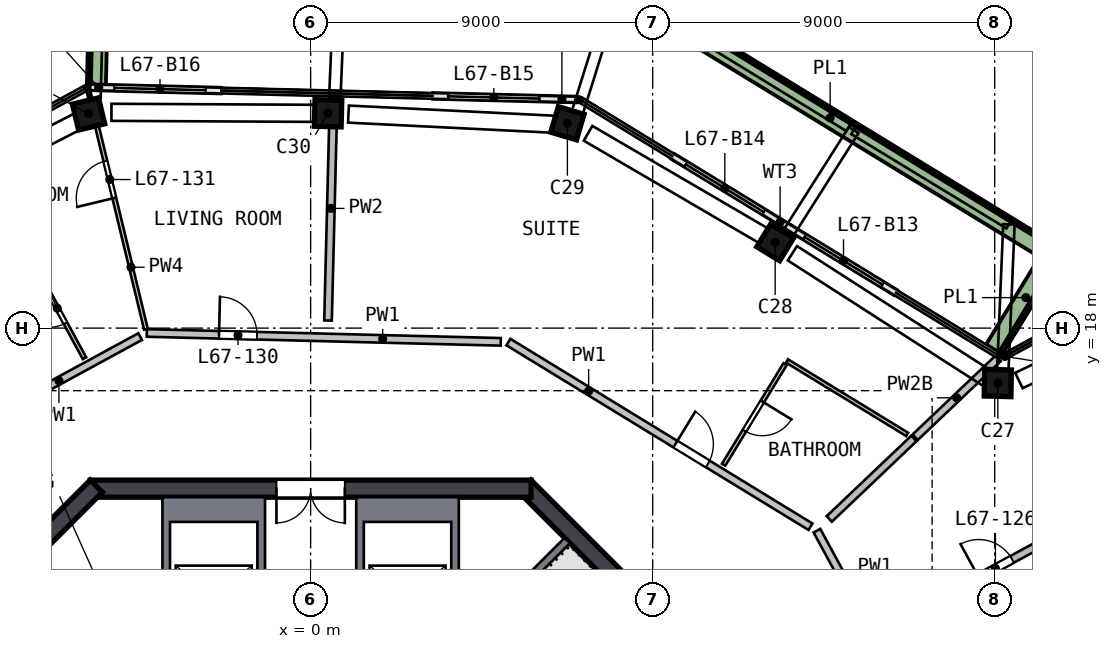
"""IFC4 building model, lengths in metres.
Left out: names, types, materials, properties, quantities, classifications, styles, units other than length and angle.
Written with IfcOpenShell. Run it as: python <this file> out.ifc"""

import sys

from ifc_helpers import new_model, si_unit, direction, frame, frame_2d, origin, origin_2d, place, context, subcontext, project, spatial, polyline, rectangle, outline, extrude, element, fill, save


model = new_model("IFC4")
c1 = context("Model", 3, precision=1e-05, world=origin(), true_north=direction((0.0, 1.0)))
c2 = subcontext(c1, "Body", "Model", "MODEL_VIEW")
j1 = project(units=[si_unit("LENGTHUNIT", "METRE"), si_unit("PLANEANGLEUNIT", "RADIAN")], contexts=[c1])
p1 = place(None, origin())
s1 = spatial("IfcSite", under=j1, at=p1, CompositionType="ELEMENT")
p2 = place(p1, origin())
s2 = spatial("IfcBuilding", under=s1, at=p2, CompositionType="ELEMENT")
p3 = place(p2, frame((0.0, 0.0, 274.0)))
s3 = spatial("IfcBuildingStorey", under=s2, at=p3, CompositionType="ELEMENT", Elevation=274.0)
p4 = place(p3, frame((18.177, 16.452, 0.0), z_axis=(-0.078901161, 0.085818315, 0.993181667), x_axis=(0.996553519, -0.018801079, 0.080793584)))
e1 = element("IfcColumn", 1, at=p4, inside=s3, PredefinedType="COLUMN", context=c2, shape_type="SweptSolid", body=[
    extrude(rectangle(XDim=0.7, YDim=0.7, at=origin_2d()), origin(), (0.0, 0.0, 1.0), 3.212),
])
p5 = place(p3, frame((12.34, 20.185, 0.0), z_axis=(-0.096505434, 0.057872841, 0.993648547), x_axis=(-0.847798451, 0.518243304, -0.112524062)))
e2 = element("IfcColumn", 2, at=p5, inside=s3, PredefinedType="COLUMN", context=c2, shape_type="SweptSolid", body=[
    extrude(rectangle(XDim=0.7, YDim=0.7, at=origin_2d()), origin(), (0.0, 0.0, 1.0), 3.21),
])
p6 = place(p3, frame((6.891, 23.353, 0.0), z_axis=(-0.111293246, 0.03185237, 0.993277021), x_axis=(0.952582043, -0.281402991, 0.115757536)))
e3 = element("IfcColumn", 3, at=p6, inside=s3, PredefinedType="COLUMN", context=c2, shape_type="SweptSolid", body=[
    extrude(rectangle(XDim=0.7, YDim=0.7, at=origin_2d()), origin(), (0.0, 0.0, 1.0), 3.211),
])
p7 = place(p3, frame((0.594, 23.651, 0.0), z_axis=(-0.112476061, 0.001901218, 0.993652616), x_axis=(-0.993332875, 0.025223407, -0.11248813)))
e4 = element("IfcColumn", 4, at=p7, inside=s3, PredefinedType="COLUMN", context=c2, shape_type="SweptSolid", body=[
    extrude(rectangle(XDim=0.7, YDim=0.7, at=origin_2d()), origin(), (0.0, 0.0, 1.0), 3.21),
])
p8 = place(p3, frame((-5.709, 23.669, 0.0), z_axis=(-0.112281885, -0.028051466, 0.99328037), x_axis=(0.965671679, 0.232561936, 0.115728794)))
e5 = element("IfcColumn", 5, at=p8, inside=s3, PredefinedType="COLUMN", context=c2, shape_type="SweptSolid", body=[
    extrude(rectangle(XDim=0.7, YDim=0.7, at=origin_2d()), origin(), (0.0, 0.0, 1.0), 3.211),
])
p9 = place(p3, frame((13.841, 5.64, 0.0), z_axis=(0.0, 0.0, 1.0), x_axis=(-0.707106781, 0.707106781, 0.0)))
e6 = element("IfcWall", 6, at=p9, inside=s3, PredefinedType="SHEAR", context=c2, shape_type="SweptSolid", body=[
    extrude(rectangle(XDim=11.598, YDim=0.45, at=frame_2d((5.799, 0.0))), origin(), (0.0, 0.0, 1.0), 3.5),
])
p10 = place(p9, frame((2.099, 0.0, 0.0)))
e7 = element("IfcOpeningElement", 7, at=p10, cuts=e6, PredefinedType="OPENING", context=c2, shape_type="SweptSolid", body=[
    extrude(rectangle(XDim=1.2, YDim=2.1, at=frame_2d((0.6, 1.05))), frame((0.0, 0.235, 0.0), z_axis=(0.0, -1.0, 0.0), x_axis=(1.0, 0.0, 0.0)), (0.0, 0.0, 1.0), 0.47),
])
p11 = place(p3, frame((5.799, 13.775, 0.0), z_axis=(0.0, 0.0, 1.0), x_axis=(-1.0, 0.0, 0.0)))
e8 = element("IfcWall", 8, at=p11, inside=s3, PredefinedType="SHEAR", context=c2, shape_type="SweptSolid", body=[
    extrude(rectangle(XDim=11.598, YDim=0.45, at=frame_2d((5.799, 0.0))), origin(), (0.0, 0.0, 1.0), 3.5),
])
p12 = place(p11, frame((4.899, 0.0, 0.0)))
e9 = element("IfcOpeningElement", 9, at=p12, cuts=e8, PredefinedType="OPENING", context=c2, shape_type="SweptSolid", body=[
    extrude(rectangle(XDim=1.8, YDim=2.1, at=frame_2d((0.9, 1.05))), frame((0.0, 0.235, 0.0), z_axis=(0.0, -1.0, 0.0), x_axis=(1.0, 0.0, 0.0)), (0.0, 0.0, 1.0), 0.47),
])
p13 = place(p3, frame((-5.64, 13.841, 0.0), z_axis=(0.0, 0.0, 1.0), x_axis=(-0.707106781, -0.707106781, 0.0)))
e10 = element("IfcWall", 10, at=p13, inside=s3, PredefinedType="SHEAR", context=c2, shape_type="SweptSolid", body=[
    extrude(rectangle(XDim=11.598, YDim=0.45, at=frame_2d((5.799, 0.0))), origin(), (0.0, 0.0, 1.0), 3.5),
])
p14 = place(p3, frame((15.387, 18.938, 0.0), z_axis=(0.0, 0.0, 1.0), x_axis=(-0.853194542, 0.521592824, 0.0)))
e11 = element("IfcWall", 11, at=p14, inside=s3, PredefinedType="SOLIDWALL", context=c2, shape_type="SweptSolid", body=[
    extrude(rectangle(XDim=3.25, YDim=0.15, at=frame_2d((1.625, 0.0))), origin(), (0.0, 0.0, 1.0), 2.525),
])
p15 = place(p14, frame((0.4, 0.0, 0.0)))
e12 = element("IfcOpeningElement", 12, at=p15, cuts=e11, PredefinedType="OPENING", context=c2, shape_type="SweptSolid", body=[
    extrude(rectangle(XDim=2.4, YDim=2.4, at=frame_2d((1.2, 1.2))), frame((0.0, 0.085, 0.0), z_axis=(0.0, -1.0, 0.0), x_axis=(1.0, 0.0, 0.0)), (0.0, 0.0, 1.0), 0.17),
])
p16 = place(p3, frame((12.614, 20.633, 0.0), z_axis=(0.0, 0.0, 1.0), x_axis=(-0.853186571, 0.521605862, 0.0)))
e13 = element("IfcWall", 13, at=p16, inside=s3, PredefinedType="SOLIDWALL", context=c2, shape_type="SweptSolid", body=[
    extrude(rectangle(XDim=3.612, YDim=0.15, at=frame_2d((1.806, 0.0))), origin(), (0.0, 0.0, 1.0), 2.525),
])
p17 = place(p16, frame((0.811, 0.0, 0.0)))
e14 = element("IfcOpeningElement", 14, at=p17, cuts=e13, PredefinedType="OPENING", context=c2, shape_type="SweptSolid", body=[
    extrude(rectangle(XDim=2.4, YDim=2.4, at=frame_2d((1.2, 1.2))), frame((0.0, 0.085, 0.0), z_axis=(0.0, -1.0, 0.0), x_axis=(1.0, 0.0, 0.0)), (0.0, 0.0, 1.0), 0.17),
])
p18 = place(p3, frame((7.006, 24.015, 0.0), z_axis=(0.0, 0.0, 1.0), x_axis=(-0.99968385, 0.025143603, 0.0)))
e15 = element("IfcWall", 15, at=p18, inside=s3, PredefinedType="SOLIDWALL", context=c2, shape_type="SweptSolid", body=[
    extrude(rectangle(XDim=3.787, YDim=0.15, at=frame_2d((1.894, 0.0))), origin(), (0.0, 0.0, 1.0), 2.525),
])
p19 = place(p18, frame((0.987, 0.0, 0.0)))
e16 = element("IfcOpeningElement", 16, at=p19, cuts=e15, PredefinedType="OPENING", context=c2, shape_type="SweptSolid", body=[
    extrude(rectangle(XDim=2.4, YDim=2.4, at=frame_2d((1.2, 1.2))), frame((0.0, 0.085, 0.0), z_axis=(0.0, -1.0, 0.0), x_axis=(1.0, 0.0, 0.0)), (0.0, 0.0, 1.0), 0.17),
])
p20 = place(p3, frame((-2.365, 24.25, 0.0), z_axis=(0.0, 0.0, 1.0), x_axis=(-0.999685462, 0.025079416, 0.0)))
e17 = element("IfcWall", 17, at=p20, inside=s3, PredefinedType="SOLIDWALL", context=c2, shape_type="SweptSolid", body=[
    extrude(rectangle(XDim=3.427, YDim=0.15, at=frame_2d((1.713, 0.0))), origin(), (0.0, 0.0, 1.0), 2.525),
])
p21 = place(p20, frame((0.4, 0.0, 0.0)))
e18 = element("IfcOpeningElement", 18, at=p21, cuts=e17, PredefinedType="OPENING", context=c2, shape_type="SweptSolid", body=[
    extrude(rectangle(XDim=2.4, YDim=2.4, at=frame_2d((1.2, 1.2))), frame((0.0, 0.085, 0.0), z_axis=(0.0, -1.0, 0.0), x_axis=(1.0, 0.0, 0.0)), (0.0, 0.0, 1.0), 0.17),
])
p22 = place(p3, frame((17.986, 17.438, 0.0), z_axis=(0.0, 0.0, 1.0), x_axis=(0.521582752, 0.853200699, 0.0)))
e19 = element("IfcWall", 19, at=p22, inside=s3, PredefinedType="SOLIDWALL", context=c2, shape_type="SweptSolid", body=[
    extrude(rectangle(XDim=3.199, YDim=0.5, at=frame_2d((1.599, 0.0))), origin(), (0.0, 0.0, 1.0), 0.7),
])
p23 = place(p3, frame((19.311, 20.084, 0.0), z_axis=(0.0, 0.0, 1.0), x_axis=(-0.853183696, 0.521610564, 0.0)))
e20 = element("IfcWall", 20, at=p23, inside=s3, PredefinedType="SOLIDWALL", context=c2, shape_type="SweptSolid", body=[
    extrude(rectangle(XDim=13.223, YDim=0.5, at=frame_2d((6.612, 0.0))), origin(), (0.0, 0.0, 1.0), 0.7),
])
p24 = place(p3, frame((-5.571, 27.107, 0.0), z_axis=(0.0, 0.0, 1.0), x_axis=(-0.025145864, -0.999683793, 0.0)))
e21 = element("IfcWall", 21, at=p24, inside=s3, PredefinedType="SOLIDWALL", context=c2, shape_type="SweptSolid", body=[
    extrude(rectangle(XDim=2.699, YDim=0.5, at=frame_2d((1.35, 0.0))), origin(), (0.0, 0.0, 1.0), 0.7),
])
p25 = place(p3, origin())
e22 = element("IfcWall", 22, at=p25, inside=s3, PredefinedType="SOLIDWALL", context=c2, shape_type="SweptSolid", body=[
    extrude(outline(polyline([(3.9, 9.9), (3.7, 9.9), (3.7, 12.9), (1.4, 12.9), (1.4, 9.9), (1.2, 9.9), (1.2, 13.55), (3.9, 13.55), (3.9, 9.9)])), origin(), (0.0, 0.0, 1.0), 3.19),
])
p26 = place(p3, origin())
e23 = element("IfcWall", 23, at=p26, inside=s3, PredefinedType="SOLIDWALL", context=c2, shape_type="SweptSolid", body=[
    extrude(outline(polyline([(-3.9, 13.55), (-1.2, 13.55), (-1.2, 9.9), (-1.4, 9.9), (-1.4, 12.9), (-3.7, 12.9), (-3.7, 9.9), (-3.9, 9.9), (-3.9, 13.55)])), origin(), (0.0, 0.0, 1.0), 3.19),
])
p27 = place(p3, frame((3.677, 9.334, 0.0), z_axis=(0.0, 0.0, 1.0), x_axis=(0.707106781, 0.707106781, 0.0)))
e24 = element("IfcWall", 24, at=p27, inside=s3, PredefinedType="SOLIDWALL", context=c2, shape_type="SweptSolid", body=[
    extrude(rectangle(XDim=4.35, YDim=0.2, at=frame_2d((2.175, 0.0))), origin(), (0.0, 0.0, 1.0), 3.19),
])
p28 = place(p3, frame((-12.493, 13.418, 0.0), z_axis=(0.0, 0.0, 1.0), x_axis=(0.878320972, 0.478071407, 0.0)))
e25 = element("IfcWall", 25, at=p28, inside=s3, PredefinedType="SOLIDWALL", context=c2, shape_type="SweptSolid", body=[
    extrude(rectangle(XDim=9.117, YDim=0.2, at=frame_2d((4.558, 0.0))), origin(), (0.0, 0.0, 1.0), 3.19),
])
p29 = place(p28, frame((3.05, 0.0, 0.0)))
e26 = element("IfcOpeningElement", 26, at=p29, cuts=e25, PredefinedType="OPENING", context=c2, shape_type="SweptSolid", body=[
    extrude(rectangle(XDim=1.0, YDim=2.1, at=frame_2d((0.5, 1.05))), frame((0.0, 0.11, 0.0), z_axis=(0.0, -1.0, 0.0), x_axis=(1.0, 0.0, 0.0)), (0.0, 0.0, 1.0), 0.22),
])
p30 = place(p3, frame((-4.311, 17.872, 0.0), z_axis=(0.0, 0.0, 1.0), x_axis=(0.99968415, -0.025131651, 0.0)))
e27 = element("IfcWall", 27, at=p30, inside=s3, PredefinedType="SOLIDWALL", context=c2, shape_type="SweptSolid", body=[
    extrude(rectangle(XDim=9.316, YDim=0.2, at=frame_2d((4.658, 0.0))), origin(), (0.0, 0.0, 1.0), 3.19),
])
p31 = place(p30, frame((1.9, 0.0, 0.0)))
e28 = element("IfcOpeningElement", 28, at=p31, cuts=e27, PredefinedType="OPENING", context=c2, shape_type="SweptSolid", body=[
    extrude(rectangle(XDim=1.0, YDim=2.1, at=frame_2d((0.5, 1.05))), frame((0.0, 0.11, 0.0), z_axis=(0.0, -1.0, 0.0), x_axis=(1.0, 0.0, 0.0)), (0.0, 0.0, 1.0), 0.22),
])
p32 = place(p3, frame((5.204, 17.633, 0.0), z_axis=(0.0, 0.0, 1.0), x_axis=(0.853192423, -0.521596289, 0.0)))
e29 = element("IfcWall", 29, at=p32, inside=s3, PredefinedType="SOLIDWALL", context=c2, shape_type="SweptSolid", body=[
    extrude(rectangle(XDim=9.316, YDim=0.2, at=frame_2d((4.658, 0.0))), origin(), (0.0, 0.0, 1.0), 3.19),
])
p33 = place(p32, frame((5.15, 0.0, 0.0)))
e30 = element("IfcOpeningElement", 30, at=p33, cuts=e29, PredefinedType="OPENING", context=c2, shape_type="SweptSolid", body=[
    extrude(rectangle(XDim=1.0, YDim=2.1, at=frame_2d((0.5, 1.05))), frame((0.0, 0.11, 0.0), z_axis=(0.0, -1.0, 0.0), x_axis=(1.0, 0.0, 0.0)), (0.0, 0.0, 1.0), 0.22),
])
p34 = place(p3, frame((13.323, 12.669, 0.0), z_axis=(0.0, 0.0, 1.0), x_axis=(0.478086253, -0.878312891, 0.0)))
e31 = element("IfcWall", 31, at=p34, inside=s3, PredefinedType="SOLIDWALL", context=c2, shape_type="SweptSolid", body=[
    extrude(rectangle(XDim=9.517, YDim=0.2, at=frame_2d((4.758, 0.0))), origin(), (0.0, 0.0, 1.0), 3.19),
])
p35 = place(p34, frame((3.869, 0.0, 0.0)))
e32 = element("IfcOpeningElement", 32, at=p35, cuts=e31, PredefinedType="OPENING", context=c2, shape_type="SweptSolid", body=[
    extrude(rectangle(XDim=1.8, YDim=2.1, at=frame_2d((0.9, 1.05))), frame((0.0, 0.11, 0.0), z_axis=(0.0, -1.0, 0.0), x_axis=(1.0, 0.0, 0.0)), (0.0, 0.0, 1.0), 0.22),
])
p36 = place(p3, frame((0.458, 18.2, 0.0), z_axis=(0.0, 0.0, 1.0), x_axis=(0.025105862, 0.999684798, 0.0)))
e33 = element("IfcWall", 33, at=p36, inside=s3, PredefinedType="SOLIDWALL", context=c2, shape_type="SweptSolid", body=[
    extrude(rectangle(XDim=5.903, YDim=0.2, at=frame_2d((2.951, 0.0))), origin(), (0.0, 0.0, 1.0), 3.19),
])
p37 = place(p3, frame((13.647, 12.977, 0.0), z_axis=(0.0, 0.0, 1.0), x_axis=(0.724630592, 0.689137509, 0.0)))
e34 = element("IfcWall", 34, at=p37, inside=s3, PredefinedType="SOLIDWALL", context=c2, shape_type="SweptSolid", body=[
    extrude(rectangle(XDim=3.075, YDim=0.2, at=frame_2d((1.537, 0.0))), origin(), (0.0, 0.0, 1.0), 3.19),
])
p38 = place(p3, frame((15.908, 15.128, 0.0), z_axis=(0.0, 0.0, 1.0), x_axis=(0.724639029, 0.689128636, 0.0)))
e35 = element("IfcWall", 35, at=p38, inside=s3, PredefinedType="SOLIDWALL", context=c2, shape_type="SweptSolid", body=[
    extrude(rectangle(XDim=3.011, YDim=0.2, at=frame_2d((1.506, 0.0))), origin(), (0.0, 0.0, 1.0), 2.69),
])
p39 = place(p3, frame((14.989, 10.026, 0.0), z_axis=(0.0, 0.0, 1.0), x_axis=(0.878310245, 0.478091114, 0.0)))
e36 = element("IfcWall", 36, at=p39, inside=s3, PredefinedType="SOLIDWALL", context=c2, shape_type="SweptSolid", body=[
    extrude(rectangle(XDim=10.252, YDim=0.2, at=frame_2d((5.126, 0.0))), origin(), (0.0, 0.0, 1.0), 3.19),
])
p40 = place(p39, frame((2.95, 0.0, 0.0)))
e37 = element("IfcOpeningElement", 37, at=p40, cuts=e36, PredefinedType="OPENING", context=c2, shape_type="SweptSolid", body=[
    extrude(rectangle(XDim=1.0, YDim=2.1, at=frame_2d((0.5, 1.05))), frame((0.0, 0.11, 0.0), z_axis=(0.0, -1.0, 0.0), x_axis=(1.0, 0.0, 0.0)), (0.0, 0.0, 1.0), 0.22),
])
p41 = place(p3, frame((25.615, 11.948, 0.0), z_axis=(0.0, 0.0, 1.0), x_axis=(-0.878310245, -0.478091114, 0.0)))
e38 = element("IfcWall", 38, at=p41, inside=s3, PredefinedType="SOLIDWALL", context=c2, shape_type="SweptSolid", body=[
    extrude(rectangle(XDim=10.252, YDim=0.2, at=frame_2d((5.126, 0.0))), origin(), (0.0, 0.0, 1.0), 3.19),
])
p42 = place(p41, frame((2.45, 0.0, 0.0)))
e39 = element("IfcOpeningElement", 39, at=p42, cuts=e38, PredefinedType="OPENING", context=c2, shape_type="SweptSolid", body=[
    extrude(rectangle(XDim=1.0, YDim=2.1, at=frame_2d((0.5, 1.05))), frame((0.0, 0.11, 0.0), z_axis=(0.0, -1.0, 0.0), x_axis=(1.0, 0.0, 0.0)), (0.0, 0.0, 1.0), 0.22),
])
p43 = place(p3, frame((-5.95, 17.207, 0.0), z_axis=(0.0, 0.0, 1.0), x_axis=(-0.478098304, 0.878306331, 0.0)))
e40 = element("IfcWall", 40, at=p43, inside=s3, PredefinedType="PARTITIONING", context=c2, shape_type="SweptSolid", body=[
    extrude(rectangle(XDim=3.2, YDim=0.1, at=frame_2d((1.6, 0.0))), origin(), (0.0, 0.0, 1.0), 3.19),
])
p44 = place(p43, frame((1.05, 0.0, 0.0)))
e41 = element("IfcOpeningElement", 41, at=p44, cuts=e40, PredefinedType="OPENING", context=c2, shape_type="SweptSolid", body=[
    extrude(rectangle(XDim=0.9, YDim=2.1, at=frame_2d((0.45, 1.05))), frame((0.0, 0.06, 0.0), z_axis=(0.0, -1.0, 0.0), x_axis=(1.0, 0.0, 0.0)), (0.0, 0.0, 1.0), 0.12),
])
p45 = place(p3, frame((-4.335, 17.973, 0.0), z_axis=(0.0, 0.0, 1.0), x_axis=(-0.234490664, 0.972118372, 0.0)))
e42 = element("IfcWall", 42, at=p45, inside=s3, PredefinedType="PARTITIONING", context=c2, shape_type="SweptSolid", body=[
    extrude(rectangle(XDim=6.476, YDim=0.1, at=frame_2d((3.238, 0.0))), origin(), (0.0, 0.0, 1.0), 3.19),
])
p46 = place(p45, frame((3.55, 0.0, 0.0)))
e43 = element("IfcOpeningElement", 43, at=p46, cuts=e42, PredefinedType="OPENING", context=c2, shape_type="SweptSolid", body=[
    extrude(rectangle(XDim=1.0, YDim=2.1, at=frame_2d((0.5, 1.05))), frame((0.0, 0.06, 0.0), z_axis=(0.0, -1.0, 0.0), x_axis=(1.0, 0.0, 0.0)), (0.0, 0.0, 1.0), 0.12),
])
p47 = place(p3, frame((12.484, 17.05, 0.0), z_axis=(0.0, 0.0, 1.0), x_axis=(-0.521669797, -0.85314748, 0.0)))
e44 = element("IfcWall", 44, at=p47, inside=s3, PredefinedType="PARTITIONING", context=c2, shape_type="SweptSolid", body=[
    extrude(rectangle(XDim=3.1, YDim=0.1, at=frame_2d((1.55, 0.0))), origin(), (0.0, 0.0, 1.0), 3.19),
])
p48 = place(p47, frame((1.15, 0.0, 0.0)))
e45 = element("IfcOpeningElement", 45, at=p48, cuts=e44, PredefinedType="OPENING", context=c2, shape_type="SweptSolid", body=[
    extrude(rectangle(XDim=0.9, YDim=2.1, at=frame_2d((0.45, 1.05))), frame((0.0, 0.06, 0.0), z_axis=(0.0, -1.0, 0.0), x_axis=(1.0, 0.0, 0.0)), (0.0, 0.0, 1.0), 0.12),
])
p49 = place(p3, frame((12.537, 17.135, 0.0), z_axis=(0.0, 0.0, 1.0), x_axis=(0.853171022, -0.521631294, 0.0)))
e46 = element("IfcWall", 46, at=p49, inside=s3, PredefinedType="PARTITIONING", context=c2, shape_type="SweptSolid", body=[
    extrude(rectangle(XDim=3.704, YDim=0.1, at=frame_2d((1.852, 0.0))), origin(), (0.0, 0.0, 1.0), 3.19),
])
p50 = place(p15, origin())
e47 = element("IfcDoor", 47, at=p50, inside=s3, OperationType="SLIDING_TO_RIGHT", PredefinedType="DOOR", context=c2, shape_type="SweptSolid", body=[
    extrude(rectangle(XDim=2.4, YDim=2.4, at=frame_2d((1.2, 1.2))), frame((0.0, 0.025, 0.0), z_axis=(0.0, -1.0, 0.0), x_axis=(1.0, 0.0, 0.0)), (0.0, 0.0, 1.0), 0.05),
])
fill(e12, e47)
p51 = place(p17, origin())
e48 = element("IfcDoor", 48, at=p51, inside=s3, OperationType="SLIDING_TO_LEFT", PredefinedType="DOOR", context=c2, shape_type="SweptSolid", body=[
    extrude(rectangle(XDim=2.4, YDim=2.4, at=frame_2d((1.2, 1.2))), frame((0.0, 0.025, 0.0), z_axis=(0.0, -1.0, 0.0), x_axis=(1.0, 0.0, 0.0)), (0.0, 0.0, 1.0), 0.05),
])
fill(e14, e48)
p52 = place(p19, origin())
e49 = element("IfcDoor", 49, at=p52, inside=s3, OperationType="SLIDING_TO_LEFT", PredefinedType="DOOR", context=c2, shape_type="SweptSolid", body=[
    extrude(rectangle(XDim=2.4, YDim=2.4, at=frame_2d((1.2, 1.2))), frame((0.0, 0.025, 0.0), z_axis=(0.0, -1.0, 0.0), x_axis=(1.0, 0.0, 0.0)), (0.0, 0.0, 1.0), 0.05),
])
fill(e16, e49)
p53 = place(p21, origin())
e50 = element("IfcDoor", 50, at=p53, inside=s3, OperationType="SLIDING_TO_RIGHT", PredefinedType="DOOR", context=c2, shape_type="SweptSolid", body=[
    extrude(rectangle(XDim=2.4, YDim=2.4, at=frame_2d((1.2, 1.2))), frame((0.0, 0.025, 0.0), z_axis=(0.0, -1.0, 0.0), x_axis=(1.0, 0.0, 0.0)), (0.0, 0.0, 1.0), 0.05),
])
fill(e18, e50)
p54 = place(p12, origin())
e51 = element("IfcDoor", 51, at=p54, inside=s3, OperationType="DOUBLE_DOOR_SINGLE_SWING", PredefinedType="DOOR", context=c2, shape_type="SweptSolid", body=[
    extrude(rectangle(XDim=1.8, YDim=2.1, at=frame_2d((0.9, 1.05))), frame((0.0, 0.025, 0.0), z_axis=(0.0, -1.0, 0.0), x_axis=(1.0, 0.0, 0.0)), (0.0, 0.0, 1.0), 0.05),
])
fill(e9, e51)
p55 = place(p40, origin())
e52 = element("IfcDoor", 52, at=p55, inside=s3, OperationType="SINGLE_SWING_LEFT", PredefinedType="DOOR", context=c2, shape_type="SweptSolid", body=[
    extrude(rectangle(XDim=1.0, YDim=2.1, at=frame_2d((0.5, 1.05))), frame((0.0, 0.025, 0.0), z_axis=(0.0, -1.0, 0.0), x_axis=(1.0, 0.0, 0.0)), (0.0, 0.0, 1.0), 0.05),
])
fill(e37, e52)
p56 = place(p33, origin())
e53 = element("IfcDoor", 53, at=p56, inside=s3, OperationType="SINGLE_SWING_LEFT", PredefinedType="DOOR", context=c2, shape_type="SweptSolid", body=[
    extrude(rectangle(XDim=1.0, YDim=2.1, at=frame_2d((0.5, 1.05))), frame((0.0, 0.025, 0.0), z_axis=(0.0, -1.0, 0.0), x_axis=(1.0, 0.0, 0.0)), (0.0, 0.0, 1.0), 0.05),
])
fill(e30, e53)
p57 = place(p48, origin())
e54 = element("IfcDoor", 54, at=p57, inside=s3, OperationType="SINGLE_SWING_LEFT", PredefinedType="DOOR", context=c2, shape_type="SweptSolid", body=[
    extrude(rectangle(XDim=0.9, YDim=2.1, at=frame_2d((0.45, 1.05))), frame((0.0, 0.025, 0.0), z_axis=(0.0, -1.0, 0.0), x_axis=(1.0, 0.0, 0.0)), (0.0, 0.0, 1.0), 0.05),
])
fill(e45, e54)
p58 = place(p31, origin())
e55 = element("IfcDoor", 55, at=p58, inside=s3, OperationType="SINGLE_SWING_LEFT", PredefinedType="DOOR", context=c2, shape_type="SweptSolid", body=[
    extrude(rectangle(XDim=1.0, YDim=2.1, at=frame_2d((0.5, 1.05))), frame((0.0, 0.025, 0.0), z_axis=(0.0, -1.0, 0.0), x_axis=(1.0, 0.0, 0.0)), (0.0, 0.0, 1.0), 0.05),
])
fill(e28, e55)
p59 = place(p46, origin())
e56 = element("IfcDoor", 56, at=p59, inside=s3, OperationType="SINGLE_SWING_LEFT", PredefinedType="DOOR", context=c2, shape_type="SweptSolid", body=[
    extrude(rectangle(XDim=1.0, YDim=2.1, at=frame_2d((0.5, 1.05))), frame((0.0, 0.025, 0.0), z_axis=(0.0, -1.0, 0.0), x_axis=(1.0, 0.0, 0.0)), (0.0, 0.0, 1.0), 0.05),
])
fill(e43, e56)
p60 = place(p44, origin())
e57 = element("IfcDoor", 57, at=p60, inside=s3, OperationType="SINGLE_SWING_RIGHT", PredefinedType="DOOR", context=c2, shape_type="SweptSolid", body=[
    extrude(rectangle(XDim=0.9, YDim=2.1, at=frame_2d((0.45, 1.05))), frame((0.0, 0.025, 0.0), z_axis=(0.0, -1.0, 0.0), x_axis=(1.0, 0.0, 0.0)), (0.0, 0.0, 1.0), 0.05),
])
fill(e41, e57)
save(model, sys.argv[1])
